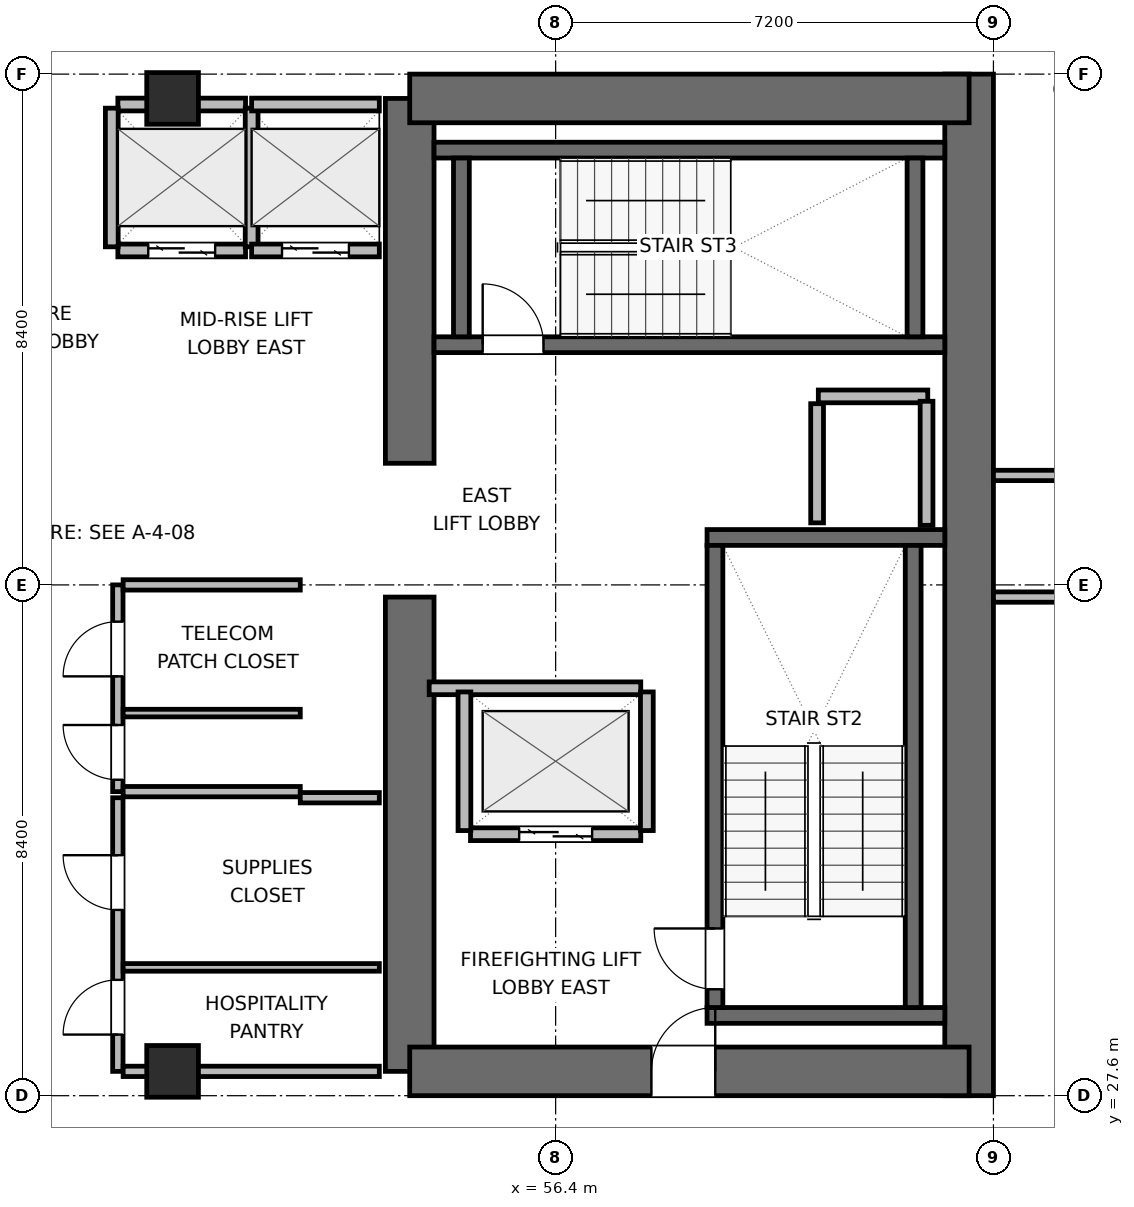
"""IFC4 building model, lengths in metres.
Left out: names, types, materials, properties, quantities, classifications, styles, units other than length and angle.
Written with IfcOpenShell. Run it as: python <this file> out.ifc"""

import sys

from ifc_helpers import new_model, si_unit, direction, frame, frame_2d, origin, origin_2d, place, context, subcontext, project, spatial, rectangle, extrude, element, fill, save


model = new_model("IFC4")
c1 = context("Model", 3, precision=1e-05, world=origin(), true_north=direction((0.0, 1.0)))
c2 = subcontext(c1, "Body", "Model", "MODEL_VIEW")
j1 = project(units=[si_unit("LENGTHUNIT", "METRE"), si_unit("PLANEANGLEUNIT", "RADIAN")], contexts=[c1])
p1 = place(None, origin())
s1 = spatial("IfcSite", under=j1, at=p1, CompositionType="ELEMENT")
p2 = place(p1, origin())
s2 = spatial("IfcBuilding", under=s1, at=p2, CompositionType="ELEMENT")
p3 = place(p2, frame((0.0, 0.0, 150.6)))
s3 = spatial("IfcBuildingStorey", under=s2, at=p3, CompositionType="ELEMENT", Elevation=150.6)
p4 = place(p3, frame((54.0, 28.0, 0.0), z_axis=(0.0, 0.0, 1.0), x_axis=(0.0, 1.0, 0.0)))
e1 = element("IfcWall", 1, at=p4, inside=s3, PredefinedType="SHEAR", context=c2, shape_type="SweptSolid", body=[
    extrude(rectangle(XDim=7.8, YDim=0.8, at=frame_2d((3.9, 0.0))), origin(), (0.0, 0.0, 1.0), 3.9),
])
p5 = place(p3, frame((54.0, 38.0, 0.0), z_axis=(0.0, 0.0, 1.0), x_axis=(0.0, 1.0, 0.0)))
e2 = element("IfcWall", 2, at=p5, inside=s3, PredefinedType="SHEAR", context=c2, shape_type="SweptSolid", body=[
    extrude(rectangle(XDim=6.0, YDim=0.8, at=frame_2d((3.0, 0.0))), origin(), (0.0, 0.0, 1.0), 3.9),
])
p6 = place(p3, frame((63.2, 27.6, 0.0), z_axis=(0.0, 0.0, 1.0), x_axis=(0.0, 1.0, 0.0)))
e3 = element("IfcWall", 3, at=p6, inside=s3, PredefinedType="SHEAR", context=c2, shape_type="SweptSolid", body=[
    extrude(rectangle(XDim=16.8, YDim=0.8, at=frame_2d((8.4, 0.0))), origin(), (0.0, 0.0, 1.0), 3.9),
])
p7 = place(p3, frame((54.0, 28.0, 0.0), z_axis=(0.0, 0.0, 1.0), x_axis=(1.0, 0.0, 0.0)))
e4 = element("IfcWall", 4, at=p7, inside=s3, PredefinedType="SHEAR", context=c2, shape_type="SweptSolid", body=[
    extrude(rectangle(XDim=9.2, YDim=0.8, at=frame_2d((4.6, 0.0))), origin(), (0.0, 0.0, 1.0), 3.9),
])
p8 = place(p7, frame((3.975, 0.0, 0.0)))
e5 = element("IfcOpeningElement", 5, at=p8, cuts=e4, PredefinedType="OPENING", context=c2, shape_type="SweptSolid", body=[
    extrude(rectangle(XDim=1.05, YDim=2.04, at=frame_2d((0.525, 1.02))), frame((0.0, 0.41, 0.0), z_axis=(0.0, -1.0, 0.0), x_axis=(1.0, 0.0, 0.0)), (0.0, 0.0, 1.0), 0.82),
])
p9 = place(p3, frame((54.0, 44.0, 0.0), z_axis=(0.0, 0.0, 1.0), x_axis=(1.0, 0.0, 0.0)))
e6 = element("IfcWall", 6, at=p9, inside=s3, PredefinedType="SHEAR", context=c2, shape_type="SweptSolid", body=[
    extrude(rectangle(XDim=9.2, YDim=0.8, at=frame_2d((4.6, 0.0))), origin(), (0.0, 0.0, 1.0), 3.9),
])
for number, where, z_axis, x_axis in (
    (7, (58.89, 28.92, 0.0), (0.0, 0.0, 1.0), (1.0, 0.0, 0.0)),
    (8, (58.89, 36.78, 0.0), (0.0, 0.0, 1.0), (1.0, 0.0, 0.0)),
):
    element("IfcWall", number, at=place(p3, frame(where, z_axis=z_axis, x_axis=x_axis)), inside=s3, PredefinedType="SHEAR", context=c2, shape_type="SweptSolid", body=[
        extrude(rectangle(XDim=3.91, YDim=0.26, at=frame_2d((1.955, 0.0))), origin(), (0.0, 0.0, 1.0), 3.9),
    ])
p10 = place(p3, frame((59.02, 29.05, 0.0), z_axis=(0.0, 0.0, 1.0), x_axis=(0.0, 1.0, 0.0)))
e9 = element("IfcWall", 9, at=p10, inside=s3, PredefinedType="SHEAR", context=c2, shape_type="SweptSolid", body=[
    extrude(rectangle(XDim=7.6, YDim=0.26, at=frame_2d((3.8, 0.0))), origin(), (0.0, 0.0, 1.0), 3.9),
])
p11 = place(p10, frame((0.3, 0.0, 0.0)))
e10 = element("IfcOpeningElement", 10, at=p11, cuts=e9, PredefinedType="OPENING", context=c2, shape_type="SweptSolid", body=[
    extrude(rectangle(XDim=1.0, YDim=2.04, at=frame_2d((0.5, 1.02))), frame((0.0, 0.14, 0.0), z_axis=(0.0, -1.0, 0.0), x_axis=(1.0, 0.0, 0.0)), (0.0, 0.0, 1.0), 0.28),
])
p12 = place(p3, frame((62.28, 29.05, 0.0), z_axis=(0.0, 0.0, 1.0), x_axis=(0.0, 1.0, 0.0)))
e11 = element("IfcWall", 11, at=p12, inside=s3, PredefinedType="SHEAR", context=c2, shape_type="SweptSolid", body=[
    extrude(rectangle(XDim=7.6, YDim=0.26, at=frame_2d((3.8, 0.0))), origin(), (0.0, 0.0, 1.0), 3.9),
])
p13 = place(p3, frame((54.4, 39.95, 0.0), z_axis=(0.0, 0.0, 1.0), x_axis=(1.0, 0.0, 0.0)))
e12 = element("IfcWall", 12, at=p13, inside=s3, PredefinedType="SHEAR", context=c2, shape_type="SweptSolid", body=[
    extrude(rectangle(XDim=8.4, YDim=0.26, at=frame_2d((4.2, 0.0))), origin(), (0.0, 0.0, 1.0), 3.9),
])
p14 = place(p13, frame((0.8, 0.0, 0.0)))
e13 = element("IfcOpeningElement", 13, at=p14, cuts=e12, PredefinedType="OPENING", context=c2, shape_type="SweptSolid", body=[
    extrude(rectangle(XDim=1.0, YDim=2.04, at=frame_2d((0.5, 1.02))), frame((0.0, 0.14, 0.0), z_axis=(0.0, -1.0, 0.0), x_axis=(1.0, 0.0, 0.0)), (0.0, 0.0, 1.0), 0.28),
])
p15 = place(p3, frame((54.4, 43.15, 0.0), z_axis=(0.0, 0.0, 1.0), x_axis=(1.0, 0.0, 0.0)))
e14 = element("IfcWall", 14, at=p15, inside=s3, PredefinedType="SHEAR", context=c2, shape_type="SweptSolid", body=[
    extrude(rectangle(XDim=8.4, YDim=0.26, at=frame_2d((4.2, 0.0))), origin(), (0.0, 0.0, 1.0), 3.9),
])
for number, where, z_axis, x_axis in (
    (15, (54.85, 40.08, 0.0), (0.0, 0.0, 1.0), (0.0, 1.0, 0.0)),
    (16, (62.31, 40.08, 0.0), (0.0, 0.0, 1.0), (0.0, 1.0, 0.0)),
):
    element("IfcWall", number, at=place(p3, frame(where, z_axis=z_axis, x_axis=x_axis)), inside=s3, PredefinedType="SHEAR", context=c2, shape_type="SweptSolid", body=[
        extrude(rectangle(XDim=2.94, YDim=0.26, at=frame_2d((1.47, 0.0))), origin(), (0.0, 0.0, 1.0), 3.9),
    ])
for number, where, z_axis, x_axis in (
    (17, (50.1, 28.0, 0.0), (0.0, 0.0, 1.0), (1.0, 0.0, 0.0)),
    (18, (50.1, 44.0, 0.0), (0.0, 0.0, 1.0), (1.0, 0.0, 0.0)),
):
    element("IfcColumn", number, at=place(p3, frame(where, z_axis=z_axis, x_axis=x_axis)), inside=s3, PredefinedType="COLUMN", context=c2, shape_type="SweptSolid", body=[
        extrude(rectangle(XDim=0.85, YDim=0.85, at=origin_2d()), origin(), (0.0, 0.0, 1.0), 3.9),
    ])
p16 = place(p3, frame((60.72, 39.1, 0.0), z_axis=(0.0, 0.0, 1.0), x_axis=(1.0, 0.0, 0.0)))
e19 = element("IfcWall", 19, at=p16, inside=s3, PredefinedType="PARTITIONING", context=c2, shape_type="SweptSolid", body=[
    extrude(rectangle(XDim=1.8, YDim=0.21, at=frame_2d((0.9, 0.0))), origin(), (0.0, 0.0, 1.0), 3.68),
])
p17 = place(p3, frame((60.7, 37.02, 0.0), z_axis=(0.0, 0.0, 1.0), x_axis=(0.0, 1.0, 0.0)))
e20 = element("IfcWall", 20, at=p17, inside=s3, PredefinedType="PARTITIONING", context=c2, shape_type="SweptSolid", body=[
    extrude(rectangle(XDim=1.96, YDim=0.21, at=frame_2d((0.98, 0.0))), origin(), (0.0, 0.0, 1.0), 3.68),
])
p18 = place(p3, frame((62.5, 36.98, 0.0), z_axis=(0.0, 0.0, 1.0), x_axis=(0.0, 1.0, 0.0)))
e21 = element("IfcWall", 21, at=p18, inside=s3, PredefinedType="PARTITIONING", context=c2, shape_type="SweptSolid", body=[
    extrude(rectangle(XDim=2.04, YDim=0.21, at=frame_2d((1.02, 0.0))), origin(), (0.0, 0.0, 1.0), 3.68),
])
p19 = place(p3, frame((55.0, 31.9, 0.0), z_axis=(0.0, 0.0, 1.0), x_axis=(1.0, 0.0, 0.0)))
e22 = element("IfcWall", 22, at=p19, inside=s3, PredefinedType="PARTITIONING", context=c2, shape_type="SweptSolid", body=[
    extrude(rectangle(XDim=2.8, YDim=0.21, at=frame_2d((1.4, 0.0))), origin(), (0.0, 0.0, 1.0), 3.68),
])
p20 = place(p19, frame((0.8, 0.0, 0.0)))
e23 = element("IfcOpeningElement", 23, at=p20, cuts=e22, PredefinedType="OPENING", context=c2, shape_type="SweptSolid", body=[
    extrude(rectangle(XDim=1.2, YDim=2.04, at=frame_2d((0.6, 1.02))), frame((0.0, 0.115, 0.0), z_axis=(0.0, -1.0, 0.0), x_axis=(1.0, 0.0, 0.0)), (0.0, 0.0, 1.0), 0.23),
])
p21 = place(p3, frame((54.32, 34.3, 0.0), z_axis=(0.0, 0.0, 1.0), x_axis=(1.0, 0.0, 0.0)))
e24 = element("IfcWall", 24, at=p21, inside=s3, PredefinedType="PARTITIONING", context=c2, shape_type="SweptSolid", body=[
    extrude(rectangle(XDim=3.48, YDim=0.21, at=frame_2d((1.74, 0.0))), origin(), (0.0, 0.0, 1.0), 3.68),
])
for number, where, z_axis, x_axis in (
    (25, (54.9, 31.96, 0.0), (0.0, 0.0, 1.0), (0.0, 1.0, 0.0)),
    (26, (57.9, 31.96, 0.0), (0.0, 0.0, 1.0), (0.0, 1.0, 0.0)),
):
    element("IfcWall", number, at=place(p3, frame(where, z_axis=z_axis, x_axis=x_axis)), inside=s3, PredefinedType="PARTITIONING", context=c2, shape_type="SweptSolid", body=[
        extrude(rectangle(XDim=2.28, YDim=0.21, at=frame_2d((1.14, 0.0))), origin(), (0.0, 0.0, 1.0), 3.68),
    ])
p22 = place(p3, frame((49.2, 41.5, 0.0), z_axis=(0.0, 0.0, 1.0), x_axis=(1.0, 0.0, 0.0)))
e27 = element("IfcWall", 27, at=p22, inside=s3, PredefinedType="PARTITIONING", context=c2, shape_type="SweptSolid", body=[
    extrude(rectangle(XDim=2.1, YDim=0.21, at=frame_2d((1.05, 0.0))), origin(), (0.0, 0.0, 1.0), 3.68),
])
p23 = place(p22, frame((0.5, 0.0, 0.0)))
e28 = element("IfcOpeningElement", 28, at=p23, cuts=e27, PredefinedType="OPENING", context=c2, shape_type="SweptSolid", body=[
    extrude(rectangle(XDim=1.1, YDim=2.04, at=frame_2d((0.55, 1.02))), frame((0.0, 0.115, 0.0), z_axis=(0.0, -1.0, 0.0), x_axis=(1.0, 0.0, 0.0)), (0.0, 0.0, 1.0), 0.23),
])
p24 = place(p3, frame((49.2, 43.9, 0.0), z_axis=(0.0, 0.0, 1.0), x_axis=(1.0, 0.0, 0.0)))
e29 = element("IfcWall", 29, at=p24, inside=s3, PredefinedType="PARTITIONING", context=c2, shape_type="SweptSolid", body=[
    extrude(rectangle(XDim=2.1, YDim=0.21, at=frame_2d((1.05, 0.0))), origin(), (0.0, 0.0, 1.0), 2.565),
])
for number, where, z_axis, x_axis in (
    (30, (49.1, 41.56, 0.0), (0.0, 0.0, 1.0), (0.0, 1.0, 0.0)),
    (31, (51.4, 41.56, 0.0), (0.0, 0.0, 1.0), (0.0, 1.0, 0.0)),
):
    element("IfcWall", number, at=place(p3, frame(where, z_axis=z_axis, x_axis=x_axis)), inside=s3, PredefinedType="PARTITIONING", context=c2, shape_type="SweptSolid", body=[
        extrude(rectangle(XDim=2.28, YDim=0.21, at=frame_2d((1.14, 0.0))), origin(), (0.0, 0.0, 1.0), 3.68),
    ])
p25 = place(p3, frame((51.4, 41.5, 0.0), z_axis=(0.0, 0.0, 1.0), x_axis=(1.0, 0.0, 0.0)))
e32 = element("IfcWall", 32, at=p25, inside=s3, PredefinedType="PARTITIONING", context=c2, shape_type="SweptSolid", body=[
    extrude(rectangle(XDim=2.1, YDim=0.21, at=frame_2d((1.05, 0.0))), origin(), (0.0, 0.0, 1.0), 3.68),
])
p26 = place(p25, frame((0.5, 0.0, 0.0)))
e33 = element("IfcOpeningElement", 33, at=p26, cuts=e32, PredefinedType="OPENING", context=c2, shape_type="SweptSolid", body=[
    extrude(rectangle(XDim=1.1, YDim=2.04, at=frame_2d((0.55, 1.02))), frame((0.0, 0.115, 0.0), z_axis=(0.0, -1.0, 0.0), x_axis=(1.0, 0.0, 0.0)), (0.0, 0.0, 1.0), 0.23),
])
p27 = place(p3, frame((51.4, 43.9, 0.0), z_axis=(0.0, 0.0, 1.0), x_axis=(1.0, 0.0, 0.0)))
e34 = element("IfcWall", 34, at=p27, inside=s3, PredefinedType="PARTITIONING", context=c2, shape_type="SweptSolid", body=[
    extrude(rectangle(XDim=2.1, YDim=0.21, at=frame_2d((1.05, 0.0))), origin(), (0.0, 0.0, 1.0), 2.565),
])
p28 = place(p3, frame((49.2, 32.6, 0.0), z_axis=(0.0, 0.0, 1.0), x_axis=(0.0, 1.0, 0.0)))
e35 = element("IfcWall", 35, at=p28, inside=s3, PredefinedType="PARTITIONING", context=c2, shape_type="SweptSolid", body=[
    extrude(rectangle(XDim=3.4, YDim=0.17, at=frame_2d((1.7, 0.0))), origin(), (0.0, 0.0, 1.0), 3.68),
])
p29 = place(p28, frame((0.196, 0.0, 0.0)))
e36 = element("IfcOpeningElement", 36, at=p29, cuts=e35, PredefinedType="OPENING", context=c2, shape_type="SweptSolid", body=[
    extrude(rectangle(XDim=0.9, YDim=2.02, at=frame_2d((0.45, 1.01))), frame((0.0, 0.095, 0.0), z_axis=(0.0, -1.0, 0.0), x_axis=(1.0, 0.0, 0.0)), (0.0, 0.0, 1.0), 0.19),
])
p30 = place(p28, frame((1.896, 0.0, 0.0)))
e37 = element("IfcOpeningElement", 37, at=p30, cuts=e35, PredefinedType="OPENING", context=c2, shape_type="SweptSolid", body=[
    extrude(rectangle(XDim=0.9, YDim=2.02, at=frame_2d((0.45, 1.01))), frame((0.0, 0.095, 0.0), z_axis=(0.0, -1.0, 0.0), x_axis=(1.0, 0.0, 0.0)), (0.0, 0.0, 1.0), 0.19),
])
for number, where, z_axis, x_axis in (
    (38, (49.287, 32.6, 0.0), (0.0, 0.0, 1.0), (1.0, 0.0, 0.0)),
    (39, (49.287, 36.0, 0.0), (0.0, 0.0, 1.0), (1.0, 0.0, 0.0)),
):
    element("IfcWall", number, at=place(p3, frame(where, z_axis=z_axis, x_axis=x_axis)), inside=s3, PredefinedType="PARTITIONING", context=c2, shape_type="SweptSolid", body=[
        extrude(rectangle(XDim=2.913, YDim=0.17, at=frame_2d((1.457, 0.0))), origin(), (0.0, 0.0, 1.0), 3.68),
    ])
p31 = place(p3, frame((49.287, 33.892, 0.0), z_axis=(0.0, 0.0, 1.0), x_axis=(1.0, 0.0, 0.0)))
e40 = element("IfcWall", 40, at=p31, inside=s3, PredefinedType="PARTITIONING", context=c2, shape_type="SweptSolid", body=[
    extrude(rectangle(XDim=2.913, YDim=0.125, at=frame_2d((1.457, 0.0))), origin(), (0.0, 0.0, 1.0), 3.68),
])
p32 = place(p3, frame((49.2, 28.0, 0.0), z_axis=(0.0, 0.0, 1.0), x_axis=(0.0, 1.0, 0.0)))
e41 = element("IfcWall", 41, at=p32, inside=s3, PredefinedType="PARTITIONING", context=c2, shape_type="SweptSolid", body=[
    extrude(rectangle(XDim=4.5, YDim=0.17, at=frame_2d((2.25, 0.0))), origin(), (0.0, 0.0, 1.0), 3.68),
])
p33 = place(p32, frame((0.605, 0.0, 0.0)))
e42 = element("IfcOpeningElement", 42, at=p33, cuts=e41, PredefinedType="OPENING", context=c2, shape_type="SweptSolid", body=[
    extrude(rectangle(XDim=0.9, YDim=2.02, at=frame_2d((0.45, 1.01))), frame((0.0, 0.095, 0.0), z_axis=(0.0, -1.0, 0.0), x_axis=(1.0, 0.0, 0.0)), (0.0, 0.0, 1.0), 0.19),
])
p34 = place(p32, frame((2.655, 0.0, 0.0)))
e43 = element("IfcOpeningElement", 43, at=p34, cuts=e41, PredefinedType="OPENING", context=c2, shape_type="SweptSolid", body=[
    extrude(rectangle(XDim=0.9, YDim=2.02, at=frame_2d((0.45, 1.01))), frame((0.0, 0.095, 0.0), z_axis=(0.0, -1.0, 0.0), x_axis=(1.0, 0.0, 0.0)), (0.0, 0.0, 1.0), 0.19),
])
p35 = place(p3, frame((49.287, 28.0, 0.0), z_axis=(0.0, 0.0, 1.0), x_axis=(1.0, 0.0, 0.0)))
e44 = element("IfcWall", 44, at=p35, inside=s3, PredefinedType="PARTITIONING", context=c2, shape_type="SweptSolid", body=[
    extrude(rectangle(XDim=4.213, YDim=0.17, at=frame_2d((2.106, 0.0))), origin(), (0.0, 0.0, 1.0), 2.565),
])
p36 = place(p3, frame((52.2, 32.5, 0.0), z_axis=(0.0, 0.0, 1.0), x_axis=(1.0, 0.0, 0.0)))
e45 = element("IfcWall", 45, at=p36, inside=s3, PredefinedType="PARTITIONING", context=c2, shape_type="SweptSolid", body=[
    extrude(rectangle(XDim=1.3, YDim=0.17, at=frame_2d((0.65, 0.0))), origin(), (0.0, 0.0, 1.0), 3.68),
])
p37 = place(p3, frame((49.287, 29.71, 0.0), z_axis=(0.0, 0.0, 1.0), x_axis=(1.0, 0.0, 0.0)))
e46 = element("IfcWall", 46, at=p37, inside=s3, PredefinedType="PARTITIONING", context=c2, shape_type="SweptSolid", body=[
    extrude(rectangle(XDim=4.213, YDim=0.125, at=frame_2d((2.106, 0.0))), origin(), (0.0, 0.0, 1.0), 3.68),
])
p38 = place(p3, frame((63.6, 35.8, 0.0), z_axis=(0.0, 0.0, 1.0), x_axis=(1.0, 0.0, 0.0)))
e47 = element("IfcWall", 47, at=p38, inside=s3, PredefinedType="PARTITIONING", context=c2, shape_type="SweptSolid", body=[
    extrude(rectangle(XDim=6.975, YDim=0.17, at=frame_2d((3.487, 0.0))), origin(), (0.0, 0.0, 1.0), 3.043),
])
p39 = place(p38, frame((1.1, 0.0, 0.0)))
e48 = element("IfcOpeningElement", 48, at=p39, cuts=e47, PredefinedType="OPENING", context=c2, shape_type="SweptSolid", body=[
    extrude(rectangle(XDim=0.95, YDim=2.04, at=frame_2d((0.475, 1.02))), frame((0.0, 0.095, 0.0), z_axis=(0.0, -1.0, 0.0), x_axis=(1.0, 0.0, 0.0)), (0.0, 0.0, 1.0), 0.19),
])
p40 = place(p3, frame((63.6, 37.8, 0.0), z_axis=(0.0, 0.0, 1.0), x_axis=(1.0, 0.0, 0.0)))
e49 = element("IfcWall", 49, at=p40, inside=s3, PredefinedType="PARTITIONING", context=c2, shape_type="SweptSolid", body=[
    extrude(rectangle(XDim=4.96, YDim=0.17, at=frame_2d((2.48, 0.0))), origin(), (0.0, 0.0, 1.0), 3.68),
])
p41 = place(p40, frame((1.1, 0.0, 0.0)))
e50 = element("IfcOpeningElement", 50, at=p41, cuts=e49, PredefinedType="OPENING", context=c2, shape_type="SweptSolid", body=[
    extrude(rectangle(XDim=0.95, YDim=2.04, at=frame_2d((0.475, 1.02))), frame((0.0, 0.095, 0.0), z_axis=(0.0, -1.0, 0.0), x_axis=(1.0, 0.0, 0.0)), (0.0, 0.0, 1.0), 0.19),
])
p42 = place(p11, origin())
e51 = element("IfcDoor", 51, at=p42, inside=s3, OperationType="SINGLE_SWING_RIGHT", PredefinedType="DOOR", context=c2, shape_type="SweptSolid", body=[
    extrude(rectangle(XDim=1.0, YDim=2.04, at=frame_2d((0.5, 1.02))), frame((0.0, 0.025, 0.0), z_axis=(0.0, -1.0, 0.0), x_axis=(1.0, 0.0, 0.0)), (0.0, 0.0, 1.0), 0.05),
])
fill(e10, e51)
p43 = place(p14, origin())
e52 = element("IfcDoor", 52, at=p43, inside=s3, OperationType="SINGLE_SWING_LEFT", PredefinedType="DOOR", context=c2, shape_type="SweptSolid", body=[
    extrude(rectangle(XDim=1.0, YDim=2.04, at=frame_2d((0.5, 1.02))), frame((0.0, 0.025, 0.0), z_axis=(0.0, -1.0, 0.0), x_axis=(1.0, 0.0, 0.0)), (0.0, 0.0, 1.0), 0.05),
])
fill(e13, e52)
p44 = place(p20, origin())
e53 = element("IfcDoor", 53, at=p44, inside=s3, OperationType="DOUBLE_DOOR_SLIDING", PredefinedType="DOOR", context=c2, shape_type="SweptSolid", body=[
    extrude(rectangle(XDim=1.2, YDim=2.04, at=frame_2d((0.6, 1.02))), frame((0.0, 0.025, 0.0), z_axis=(0.0, -1.0, 0.0), x_axis=(1.0, 0.0, 0.0)), (0.0, 0.0, 1.0), 0.05),
])
fill(e23, e53)
p45 = place(p23, origin())
e54 = element("IfcDoor", 54, at=p45, inside=s3, OperationType="DOUBLE_DOOR_SLIDING", PredefinedType="DOOR", context=c2, shape_type="SweptSolid", body=[
    extrude(rectangle(XDim=1.1, YDim=2.04, at=frame_2d((0.55, 1.02))), frame((0.0, 0.025, 0.0), z_axis=(0.0, -1.0, 0.0), x_axis=(1.0, 0.0, 0.0)), (0.0, 0.0, 1.0), 0.05),
])
fill(e28, e54)
p46 = place(p26, origin())
e55 = element("IfcDoor", 55, at=p46, inside=s3, OperationType="DOUBLE_DOOR_SLIDING", PredefinedType="DOOR", context=c2, shape_type="SweptSolid", body=[
    extrude(rectangle(XDim=1.1, YDim=2.04, at=frame_2d((0.55, 1.02))), frame((0.0, 0.025, 0.0), z_axis=(0.0, -1.0, 0.0), x_axis=(1.0, 0.0, 0.0)), (0.0, 0.0, 1.0), 0.05),
])
fill(e33, e55)
p47 = place(p8, origin())
e56 = element("IfcDoor", 56, at=p47, inside=s3, OperationType="SINGLE_SWING_RIGHT", PredefinedType="DOOR", context=c2, shape_type="SweptSolid", body=[
    extrude(rectangle(XDim=1.05, YDim=2.04, at=frame_2d((0.525, 1.02))), frame((0.0, 0.025, 0.0), z_axis=(0.0, -1.0, 0.0), x_axis=(1.0, 0.0, 0.0)), (0.0, 0.0, 1.0), 0.05),
])
fill(e5, e56)
p48 = place(p29, origin())
e57 = element("IfcDoor", 57, at=p48, inside=s3, OperationType="SINGLE_SWING_RIGHT", PredefinedType="DOOR", context=c2, shape_type="SweptSolid", body=[
    extrude(rectangle(XDim=0.9, YDim=2.02, at=frame_2d((0.45, 1.01))), frame((0.0, 0.025, 0.0), z_axis=(0.0, -1.0, 0.0), x_axis=(1.0, 0.0, 0.0)), (0.0, 0.0, 1.0), 0.05),
])
fill(e36, e57)
p49 = place(p30, origin())
e58 = element("IfcDoor", 58, at=p49, inside=s3, OperationType="SINGLE_SWING_LEFT", PredefinedType="DOOR", context=c2, shape_type="SweptSolid", body=[
    extrude(rectangle(XDim=0.9, YDim=2.02, at=frame_2d((0.45, 1.01))), frame((0.0, 0.025, 0.0), z_axis=(0.0, -1.0, 0.0), x_axis=(1.0, 0.0, 0.0)), (0.0, 0.0, 1.0), 0.05),
])
fill(e37, e58)
p50 = place(p33, origin())
e59 = element("IfcDoor", 59, at=p50, inside=s3, OperationType="SINGLE_SWING_LEFT", PredefinedType="DOOR", context=c2, shape_type="SweptSolid", body=[
    extrude(rectangle(XDim=0.9, YDim=2.02, at=frame_2d((0.45, 1.01))), frame((0.0, 0.025, 0.0), z_axis=(0.0, -1.0, 0.0), x_axis=(1.0, 0.0, 0.0)), (0.0, 0.0, 1.0), 0.05),
])
fill(e42, e59)
p51 = place(p34, origin())
e60 = element("IfcDoor", 60, at=p51, inside=s3, OperationType="SINGLE_SWING_RIGHT", PredefinedType="DOOR", context=c2, shape_type="SweptSolid", body=[
    extrude(rectangle(XDim=0.9, YDim=2.02, at=frame_2d((0.45, 1.01))), frame((0.0, 0.025, 0.0), z_axis=(0.0, -1.0, 0.0), x_axis=(1.0, 0.0, 0.0)), (0.0, 0.0, 1.0), 0.05),
])
fill(e43, e60)
save(model, sys.argv[1])
